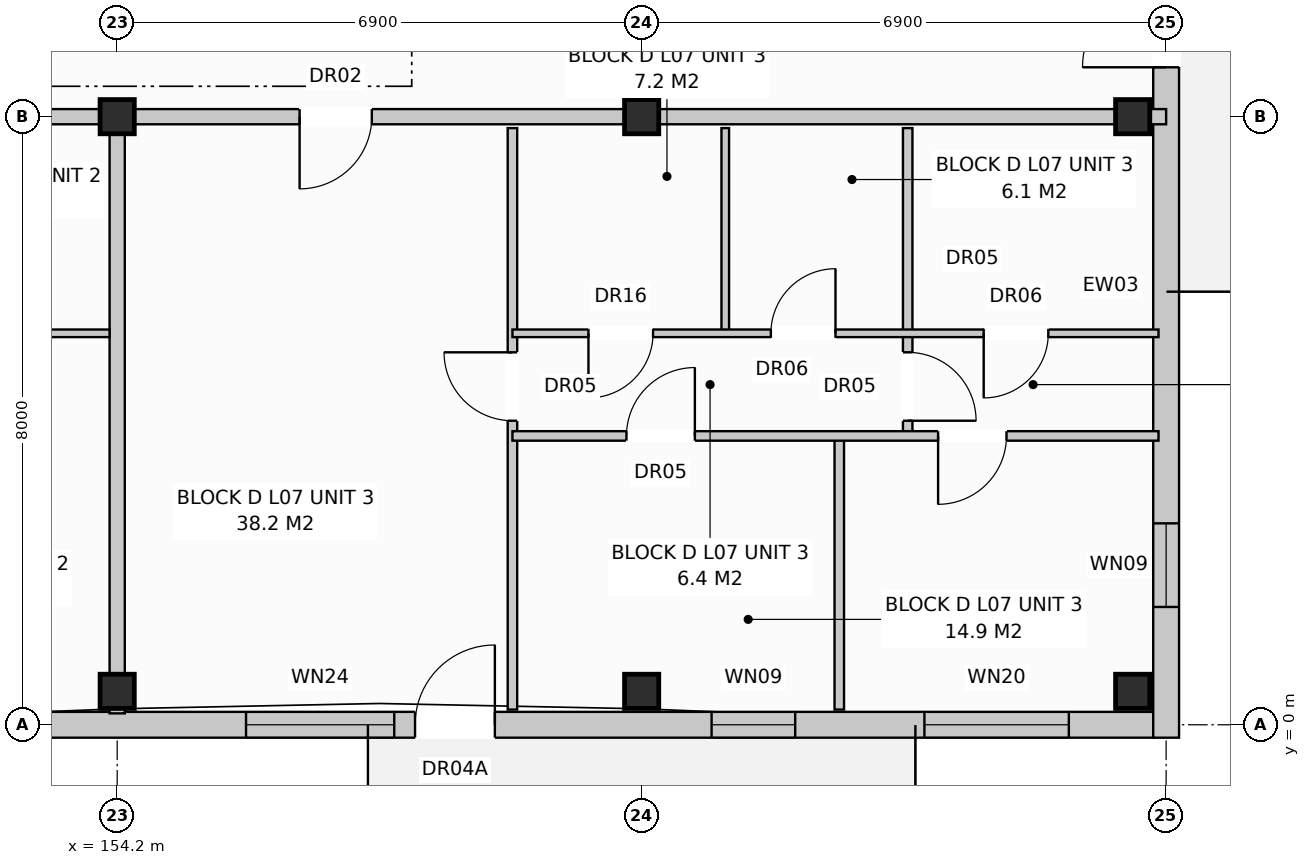
"""IFC4 building model, lengths in metres.
Left out: names, types, materials, properties, quantities, classifications, styles, units other than length and angle.
Written with IfcOpenShell. Run it as: python <this file> out.ifc"""

import sys

from ifc_helpers import new_model, si_unit, direction, frame, frame_2d, origin, origin_with_axes, origin_2d, place, context, subcontext, project, spatial, rectangle, extrude, element, fill, save


model = new_model("IFC4")
c1 = context("Model", 3, precision=1e-05, world=origin(), true_north=direction((0.0, 1.0)))
c2 = subcontext(c1, "Body", "Model", "MODEL_VIEW")
j1 = project(units=[si_unit("LENGTHUNIT", "METRE"), si_unit("PLANEANGLEUNIT", "RADIAN")], contexts=[c1])
p1 = place(None, origin())
s1 = spatial("IfcSite", under=j1, at=p1, CompositionType="ELEMENT")
p2 = place(p1, origin())
s2 = spatial("IfcBuilding", under=s1, at=p2, CompositionType="ELEMENT")
p3 = place(p2, frame((0.0, 0.0, 24.0)))
s3 = spatial("IfcBuildingStorey", under=s2, at=p3, CompositionType="ELEMENT", Elevation=24.0)
for number, where, z_axis, x_axis in (
    (1, (154.2, 0.44, 0.0), (0.0, 0.0, 1.0), (1.0, 0.0, 0.0)),
    (2, (154.2, 8.0, 0.0), (0.0, 0.0, 1.0), (1.0, 0.0, 0.0)),
    (3, (161.1, 0.44, 0.0), (0.0, 0.0, 1.0), (1.0, 0.0, 0.0)),
    (4, (161.1, 8.0, 0.0), (0.0, 0.0, 1.0), (1.0, 0.0, 0.0)),
    (5, (167.56, 0.44, 0.0), (0.0, 0.0, 1.0), (1.0, 0.0, 0.0)),
    (6, (167.56, 8.0, 0.0), (0.0, 0.0, 1.0), (1.0, 0.0, 0.0)),
):
    element("IfcColumn", number, at=place(p3, frame(where, z_axis=z_axis, x_axis=x_axis)), inside=s3, PredefinedType="COLUMN", context=c2, shape_type="SweptSolid", body=[
        extrude(rectangle(XDim=0.45, YDim=0.45, at=origin_2d()), origin(), (0.0, 0.0, 1.0), 3.2),
    ])
p4 = place(p3, frame((126.76, 0.0, 0.0), z_axis=(0.0, 0.0, 1.0), x_axis=(1.0, 0.0, 0.0)))
e7 = element("IfcWall", 7, at=p4, inside=s3, PredefinedType="STANDARD", context=c2, shape_type="SweptSolid", body=[
    extrude(rectangle(XDim=41.08, YDim=0.34, at=frame_2d((20.54, 0.0))), origin(), (0.0, 0.0, 1.0), 2.95),
])
p5 = place(p4, frame((5.06, 0.0, 0.0)))
e8 = element("IfcOpeningElement", 8, at=p5, cuts=e7, PredefinedType="OPENING", context=c2, shape_type="SweptSolid", body=[
    extrude(rectangle(XDim=1.05, YDim=2.12, at=frame_2d((0.525, 1.06))), frame((0.0, 0.182, 0.0), z_axis=(0.0, -1.0, 0.0), x_axis=(1.0, 0.0, 0.0)), (0.0, 0.0, 1.0), 0.364),
])
p6 = place(p4, frame((18.86, 0.0, 0.0)))
e9 = element("IfcOpeningElement", 9, at=p6, cuts=e7, PredefinedType="OPENING", context=c2, shape_type="SweptSolid", body=[
    extrude(rectangle(XDim=1.05, YDim=2.12, at=frame_2d((0.525, 1.06))), frame((0.0, 0.182, 0.0), z_axis=(0.0, -1.0, 0.0), x_axis=(1.0, 0.0, 0.0)), (0.0, 0.0, 1.0), 0.364),
])
p7 = place(p4, frame((31.359, 0.0, 0.0)))
e10 = element("IfcOpeningElement", 10, at=p7, cuts=e7, PredefinedType="OPENING", context=c2, shape_type="SweptSolid", body=[
    extrude(rectangle(XDim=1.05, YDim=2.12, at=frame_2d((0.525, 1.06))), frame((0.0, 0.182, 0.0), z_axis=(0.0, -1.0, 0.0), x_axis=(1.0, 0.0, 0.0)), (0.0, 0.0, 1.0), 0.364),
])
p8 = place(p4, frame((1.11, 0.0, 0.8)))
e11 = element("IfcOpeningElement", 11, at=p8, cuts=e7, PredefinedType="OPENING", context=c2, shape_type="SweptSolid", body=[
    extrude(rectangle(XDim=1.8, YDim=1.7, at=frame_2d((0.9, 0.85))), frame((0.0, 0.182, 0.0), z_axis=(0.0, -1.0, 0.0), x_axis=(1.0, 0.0, 0.0)), (0.0, 0.0, 1.0), 0.364),
])
p9 = place(p4, frame((9.36, 0.0, 0.72)))
e12 = element("IfcOpeningElement", 12, at=p9, cuts=e7, PredefinedType="OPENING", context=c2, shape_type="SweptSolid", body=[
    extrude(rectangle(XDim=1.1, YDim=1.5, at=frame_2d((0.55, 0.75))), frame((0.0, 0.182, 0.0), z_axis=(0.0, -1.0, 0.0), x_axis=(1.0, 0.0, 0.0)), (0.0, 0.0, 1.0), 0.364),
])
p10 = place(p4, frame((14.635, 0.0, 0.8)))
e13 = element("IfcOpeningElement", 13, at=p10, cuts=e7, PredefinedType="OPENING", context=c2, shape_type="SweptSolid", body=[
    extrude(rectangle(XDim=1.95, YDim=1.65, at=frame_2d((0.975, 0.825))), frame((0.0, 0.182, 0.0), z_axis=(0.0, -1.0, 0.0), x_axis=(1.0, 0.0, 0.0)), (0.0, 0.0, 1.0), 0.364),
])
p11 = place(p4, frame((21.46, 0.0, 0.72)))
e14 = element("IfcOpeningElement", 14, at=p11, cuts=e7, PredefinedType="OPENING", context=c2, shape_type="SweptSolid", body=[
    extrude(rectangle(XDim=1.1, YDim=1.5, at=frame_2d((0.55, 0.75))), frame((0.0, 0.182, 0.0), z_axis=(0.0, -1.0, 0.0), x_axis=(1.0, 0.0, 0.0)), (0.0, 0.0, 1.0), 0.364),
])
p12 = place(p4, frame((24.46, 0.0, 0.8)))
e15 = element("IfcOpeningElement", 15, at=p12, cuts=e7, PredefinedType="OPENING", context=c2, shape_type="SweptSolid", body=[
    extrude(rectangle(XDim=1.9, YDim=1.85, at=frame_2d((0.95, 0.925))), frame((0.0, 0.182, 0.0), z_axis=(0.0, -1.0, 0.0), x_axis=(1.0, 0.0, 0.0)), (0.0, 0.0, 1.0), 0.364),
])
p13 = place(p4, frame((29.135, 0.0, 0.8)))
e16 = element("IfcOpeningElement", 16, at=p13, cuts=e7, PredefinedType="OPENING", context=c2, shape_type="SweptSolid", body=[
    extrude(rectangle(XDim=1.95, YDim=1.65, at=frame_2d((0.975, 0.825))), frame((0.0, 0.182, 0.0), z_axis=(0.0, -1.0, 0.0), x_axis=(1.0, 0.0, 0.0)), (0.0, 0.0, 1.0), 0.364),
])
p14 = place(p4, frame((35.26, 0.0, 0.72)))
e17 = element("IfcOpeningElement", 17, at=p14, cuts=e7, PredefinedType="OPENING", context=c2, shape_type="SweptSolid", body=[
    extrude(rectangle(XDim=1.1, YDim=1.5, at=frame_2d((0.55, 0.75))), frame((0.0, 0.182, 0.0), z_axis=(0.0, -1.0, 0.0), x_axis=(1.0, 0.0, 0.0)), (0.0, 0.0, 1.0), 0.364),
])
p15 = place(p4, frame((38.06, 0.0, 0.8)))
e18 = element("IfcOpeningElement", 18, at=p15, cuts=e7, PredefinedType="OPENING", context=c2, shape_type="SweptSolid", body=[
    extrude(rectangle(XDim=1.9, YDim=1.85, at=frame_2d((0.95, 0.925))), frame((0.0, 0.182, 0.0), z_axis=(0.0, -1.0, 0.0), x_axis=(1.0, 0.0, 0.0)), (0.0, 0.0, 1.0), 0.364),
])
p16 = place(p3, frame((168.0, -0.17, 0.0), z_axis=(0.0, 0.0, 1.0), x_axis=(0.0, 1.0, 0.0)))
e19 = element("IfcWall", 19, at=p16, inside=s3, PredefinedType="STANDARD", context=c2, shape_type="SweptSolid", body=[
    extrude(rectangle(XDim=18.74, YDim=0.34, at=frame_2d((9.37, 0.0))), origin(), (0.0, 0.0, 1.0), 2.95),
])
p17 = place(p16, frame((8.82, 0.0, 0.0)))
e20 = element("IfcOpeningElement", 20, at=p17, cuts=e19, PredefinedType="OPENING", context=c2, shape_type="SweptSolid", body=[
    extrude(rectangle(XDim=1.1, YDim=2.1, at=frame_2d((0.55, 1.05))), frame((0.0, 0.182, 0.0), z_axis=(0.0, -1.0, 0.0), x_axis=(1.0, 0.0, 0.0)), (0.0, 0.0, 1.0), 0.364),
])
p18 = place(p16, frame((1.72, 0.0, 0.72)))
e21 = element("IfcOpeningElement", 21, at=p18, cuts=e19, PredefinedType="OPENING", context=c2, shape_type="SweptSolid", body=[
    extrude(rectangle(XDim=1.1, YDim=1.5, at=frame_2d((0.55, 0.75))), frame((0.0, 0.182, 0.0), z_axis=(0.0, -1.0, 0.0), x_axis=(1.0, 0.0, 0.0)), (0.0, 0.0, 1.0), 0.364),
])
p19 = place(p16, frame((15.92, 0.0, 0.72)))
e22 = element("IfcOpeningElement", 22, at=p19, cuts=e19, PredefinedType="OPENING", context=c2, shape_type="SweptSolid", body=[
    extrude(rectangle(XDim=1.1, YDim=1.5, at=frame_2d((0.55, 0.75))), frame((0.0, 0.182, 0.0), z_axis=(0.0, -1.0, 0.0), x_axis=(1.0, 0.0, 0.0)), (0.0, 0.0, 1.0), 0.364),
])
p20 = place(p3, frame((154.2, 7.85, 0.0), z_axis=(0.0, 0.0, 1.0), x_axis=(0.0, -1.0, 0.0)))
e23 = element("IfcWall", 23, at=p20, inside=s3, PredefinedType="PARTITIONING", context=c2, shape_type="SweptSolid", body=[
    extrude(rectangle(XDim=7.7, YDim=0.2, at=frame_2d((3.85, 0.0))), origin(), (0.0, 0.0, 1.0), 2.95),
])
p21 = place(p3, frame((133.5, 8.0, 0.0), z_axis=(0.0, 0.0, 1.0), x_axis=(1.0, 0.0, 0.0)))
e24 = element("IfcWall", 24, at=p21, inside=s3, PredefinedType="PARTITIONING", context=c2, shape_type="SweptSolid", body=[
    extrude(rectangle(XDim=20.7, YDim=0.2, at=frame_2d((10.35, 0.0))), origin(), (0.0, 0.0, 1.0), 2.39),
])
p22 = place(p21, frame((2.4, 0.0, 0.0)))
e25 = element("IfcOpeningElement", 25, at=p22, cuts=e24, PredefinedType="OPENING", context=c2, shape_type="SweptSolid", body=[
    extrude(rectangle(XDim=0.95, YDim=2.15, at=frame_2d((0.475, 1.075))), frame((0.0, 0.112, 0.0), z_axis=(0.0, -1.0, 0.0), x_axis=(1.0, 0.0, 0.0)), (0.0, 0.0, 1.0), 0.224),
])
p23 = place(p3, frame((139.8, 5.15, 0.0), z_axis=(0.0, 0.0, 1.0), x_axis=(1.0, 0.0, 0.0)))
e26 = element("IfcWall", 26, at=p23, inside=s3, PredefinedType="PARTITIONING", context=c2, shape_type="SweptSolid", body=[
    extrude(rectangle(XDim=14.3, YDim=0.1, at=frame_2d((7.15, 0.0))), origin(), (0.0, 0.0, 1.0), 2.95),
])
p24 = place(p23, frame((1.6, 0.0, 0.0)))
e27 = element("IfcOpeningElement", 27, at=p24, cuts=e26, PredefinedType="OPENING", context=c2, shape_type="SweptSolid", body=[
    extrude(rectangle(XDim=0.9, YDim=2.1, at=frame_2d((0.45, 1.05))), frame((0.0, 0.062, 0.0), z_axis=(0.0, -1.0, 0.0), x_axis=(1.0, 0.0, 0.0)), (0.0, 0.0, 1.0), 0.124),
])
p25 = place(p23, frame((5.1, 0.0, 0.0)))
e28 = element("IfcOpeningElement", 28, at=p25, cuts=e26, PredefinedType="OPENING", context=c2, shape_type="SweptSolid", body=[
    extrude(rectangle(XDim=0.85, YDim=2.05, at=frame_2d((0.425, 1.025))), frame((0.0, 0.062, 0.0), z_axis=(0.0, -1.0, 0.0), x_axis=(1.0, 0.0, 0.0)), (0.0, 0.0, 1.0), 0.124),
])
p26 = place(p23, frame((8.2, 0.0, 0.0)))
e29 = element("IfcOpeningElement", 29, at=p26, cuts=e26, PredefinedType="OPENING", context=c2, shape_type="SweptSolid", body=[
    extrude(rectangle(XDim=0.85, YDim=2.05, at=frame_2d((0.425, 1.025))), frame((0.0, 0.062, 0.0), z_axis=(0.0, -1.0, 0.0), x_axis=(1.0, 0.0, 0.0)), (0.0, 0.0, 1.0), 0.124),
])
p27 = place(p23, frame((11.6, 0.0, 0.0)))
e30 = element("IfcOpeningElement", 30, at=p27, cuts=e26, PredefinedType="OPENING", context=c2, shape_type="SweptSolid", body=[
    extrude(rectangle(XDim=0.85, YDim=2.05, at=frame_2d((0.425, 1.025))), frame((0.0, 0.062, 0.0), z_axis=(0.0, -1.0, 0.0), x_axis=(1.0, 0.0, 0.0)), (0.0, 0.0, 1.0), 0.124),
])
p28 = place(p3, frame((154.2, 8.0, 0.0), z_axis=(0.0, 0.0, 1.0), x_axis=(1.0, 0.0, 0.0)))
e31 = element("IfcWall", 31, at=p28, inside=s3, PredefinedType="PARTITIONING", context=c2, shape_type="SweptSolid", body=[
    extrude(rectangle(XDim=13.8, YDim=0.2, at=frame_2d((6.9, 0.0))), origin(), (0.0, 0.0, 1.0), 2.39),
])
p29 = place(p28, frame((2.4, 0.0, 0.0)))
e32 = element("IfcOpeningElement", 32, at=p29, cuts=e31, PredefinedType="OPENING", context=c2, shape_type="SweptSolid", body=[
    extrude(rectangle(XDim=0.95, YDim=2.15, at=frame_2d((0.475, 1.075))), frame((0.0, 0.112, 0.0), z_axis=(0.0, -1.0, 0.0), x_axis=(1.0, 0.0, 0.0)), (0.0, 0.0, 1.0), 0.224),
])
p30 = place(p3, frame((159.4, 7.85, 0.0), z_axis=(0.0, 0.0, 1.0), x_axis=(0.0, -1.0, 0.0)))
e33 = element("IfcWall", 33, at=p30, inside=s3, PredefinedType="PARTITIONING", context=c2, shape_type="SweptSolid", body=[
    extrude(rectangle(XDim=7.65, YDim=0.125, at=frame_2d((3.825, 0.0))), origin(), (0.0, 0.0, 1.0), 2.95),
])
p31 = place(p30, frame((2.95, 0.0, 0.0)))
e34 = element("IfcOpeningElement", 34, at=p31, cuts=e33, PredefinedType="OPENING", context=c2, shape_type="SweptSolid", body=[
    extrude(rectangle(XDim=0.9, YDim=2.1, at=frame_2d((0.45, 1.05))), frame((0.0, 0.074, 0.0), z_axis=(0.0, -1.0, 0.0), x_axis=(1.0, 0.0, 0.0)), (0.0, 0.0, 1.0), 0.149),
])
p32 = place(p3, frame((162.2, 7.85, 0.0), z_axis=(0.0, 0.0, 1.0), x_axis=(0.0, -1.0, 0.0)))
e35 = element("IfcWall", 35, at=p32, inside=s3, PredefinedType="PARTITIONING", context=c2, shape_type="SweptSolid", body=[
    extrude(rectangle(XDim=2.7, YDim=0.1, at=frame_2d((1.35, 0.0))), origin(), (0.0, 0.0, 1.0), 2.95),
])
p33 = place(p3, frame((164.6, 7.85, 0.0), z_axis=(0.0, 0.0, 1.0), x_axis=(0.0, -1.0, 0.0)))
e36 = element("IfcWall", 36, at=p33, inside=s3, PredefinedType="PARTITIONING", context=c2, shape_type="SweptSolid", body=[
    extrude(rectangle(XDim=4.05, YDim=0.125, at=frame_2d((2.025, 0.0))), origin(), (0.0, 0.0, 1.0), 2.95),
])
p34 = place(p33, frame((2.95, 0.0, 0.0)))
e37 = element("IfcOpeningElement", 37, at=p34, cuts=e36, PredefinedType="OPENING", context=c2, shape_type="SweptSolid", body=[
    extrude(rectangle(XDim=0.9, YDim=2.1, at=frame_2d((0.45, 1.05))), frame((0.0, 0.074, 0.0), z_axis=(0.0, -1.0, 0.0), x_axis=(1.0, 0.0, 0.0)), (0.0, 0.0, 1.0), 0.149),
])
p35 = place(p3, frame((163.7, 3.8, 0.0), z_axis=(0.0, 0.0, 1.0), x_axis=(0.0, -1.0, 0.0)))
e38 = element("IfcWall", 38, at=p35, inside=s3, PredefinedType="PARTITIONING", context=c2, shape_type="SweptSolid", body=[
    extrude(rectangle(XDim=3.6, YDim=0.125, at=frame_2d((1.8, 0.0))), origin(), (0.0, 0.0, 1.0), 2.59),
])
p36 = place(p3, frame((159.4, 5.15, 0.0), z_axis=(0.0, 0.0, 1.0), x_axis=(1.0, 0.0, 0.0)))
e39 = element("IfcWall", 39, at=p36, inside=s3, PredefinedType="PARTITIONING", context=c2, shape_type="SweptSolid", body=[
    extrude(rectangle(XDim=8.5, YDim=0.1, at=frame_2d((4.25, 0.0))), origin(), (0.0, 0.0, 1.0), 2.95),
])
p37 = place(p36, frame((1.0, 0.0, 0.0)))
e40 = element("IfcOpeningElement", 40, at=p37, cuts=e39, PredefinedType="OPENING", context=c2, shape_type="SweptSolid", body=[
    extrude(rectangle(XDim=0.85, YDim=2.1, at=frame_2d((0.425, 1.05))), frame((0.0, 0.062, 0.0), z_axis=(0.0, -1.0, 0.0), x_axis=(1.0, 0.0, 0.0)), (0.0, 0.0, 1.0), 0.124),
])
p38 = place(p36, frame((3.4, 0.0, 0.0)))
e41 = element("IfcOpeningElement", 41, at=p38, cuts=e39, PredefinedType="OPENING", context=c2, shape_type="SweptSolid", body=[
    extrude(rectangle(XDim=0.85, YDim=2.05, at=frame_2d((0.425, 1.025))), frame((0.0, 0.062, 0.0), z_axis=(0.0, -1.0, 0.0), x_axis=(1.0, 0.0, 0.0)), (0.0, 0.0, 1.0), 0.124),
])
p39 = place(p36, frame((6.2, 0.0, 0.0)))
e42 = element("IfcOpeningElement", 42, at=p39, cuts=e39, PredefinedType="OPENING", context=c2, shape_type="SweptSolid", body=[
    extrude(rectangle(XDim=0.85, YDim=2.05, at=frame_2d((0.425, 1.025))), frame((0.0, 0.062, 0.0), z_axis=(0.0, -1.0, 0.0), x_axis=(1.0, 0.0, 0.0)), (0.0, 0.0, 1.0), 0.124),
])
p40 = place(p3, frame((159.4, 3.8, 0.0), z_axis=(0.0, 0.0, 1.0), x_axis=(1.0, 0.0, 0.0)))
e43 = element("IfcWall", 43, at=p40, inside=s3, PredefinedType="PARTITIONING", context=c2, shape_type="SweptSolid", body=[
    extrude(rectangle(XDim=8.5, YDim=0.125, at=frame_2d((4.25, 0.0))), origin(), (0.0, 0.0, 1.0), 2.95),
])
p41 = place(p40, frame((1.5, 0.0, 0.0)))
e44 = element("IfcOpeningElement", 44, at=p41, cuts=e43, PredefinedType="OPENING", context=c2, shape_type="SweptSolid", body=[
    extrude(rectangle(XDim=0.9, YDim=2.1, at=frame_2d((0.45, 1.05))), frame((0.0, 0.074, 0.0), z_axis=(0.0, -1.0, 0.0), x_axis=(1.0, 0.0, 0.0)), (0.0, 0.0, 1.0), 0.149),
])
p42 = place(p40, frame((5.6, 0.0, 0.0)))
e45 = element("IfcOpeningElement", 45, at=p42, cuts=e43, PredefinedType="OPENING", context=c2, shape_type="SweptSolid", body=[
    extrude(rectangle(XDim=0.9, YDim=2.1, at=frame_2d((0.45, 1.05))), frame((0.0, 0.074, 0.0), z_axis=(0.0, -1.0, 0.0), x_axis=(1.0, 0.0, 0.0)), (0.0, 0.0, 1.0), 0.149),
])
p43 = place(p7, origin_with_axes())
e46 = element("IfcDoor", 46, at=p43, inside=s3, OperationType="SINGLE_SWING_RIGHT", PredefinedType="DOOR", context=c2, shape_type="SweptSolid", body=[
    extrude(rectangle(XDim=1.05, YDim=2.12, at=frame_2d((0.525, 1.06))), frame((0.0, 0.025, 0.0), z_axis=(0.0, -1.0, 0.0), x_axis=(1.0, 0.0, 0.0)), (0.0, 0.0, 1.0), 0.05),
])
fill(e10, e46)
p44 = place(p13, origin_with_axes())
e47 = element("IfcWindow", 47, at=p44, inside=s3, PartitioningType="SINGLE_PANEL", PredefinedType="WINDOW", context=c2, shape_type="SweptSolid", body=[
    extrude(rectangle(XDim=1.95, YDim=1.65, at=frame_2d((0.975, 0.825))), frame((0.0, 0.03, 0.0), z_axis=(0.0, -1.0, 0.0), x_axis=(1.0, 0.0, 0.0)), (0.0, 0.0, 1.0), 0.06),
])
fill(e16, e47)
p45 = place(p14, origin_with_axes())
e48 = element("IfcWindow", 48, at=p45, inside=s3, PartitioningType="SINGLE_PANEL", PredefinedType="WINDOW", context=c2, shape_type="SweptSolid", body=[
    extrude(rectangle(XDim=1.1, YDim=1.5, at=frame_2d((0.55, 0.75))), frame((0.0, 0.03, 0.0), z_axis=(0.0, -1.0, 0.0), x_axis=(1.0, 0.0, 0.0)), (0.0, 0.0, 1.0), 0.06),
])
fill(e17, e48)
p46 = place(p15, origin_with_axes())
e49 = element("IfcWindow", 49, at=p46, inside=s3, PartitioningType="SINGLE_PANEL", PredefinedType="WINDOW", context=c2, shape_type="SweptSolid", body=[
    extrude(rectangle(XDim=1.9, YDim=1.85, at=frame_2d((0.95, 0.925))), frame((0.0, 0.03, 0.0), z_axis=(0.0, -1.0, 0.0), x_axis=(1.0, 0.0, 0.0)), (0.0, 0.0, 1.0), 0.06),
])
fill(e18, e49)
p47 = place(p17, origin_with_axes())
e50 = element("IfcDoor", 50, at=p47, inside=s3, OperationType="SINGLE_SWING_LEFT", PredefinedType="DOOR", context=c2, shape_type="SweptSolid", body=[
    extrude(rectangle(XDim=1.1, YDim=2.1, at=frame_2d((0.55, 1.05))), frame((0.0, 0.025, 0.0), z_axis=(0.0, -1.0, 0.0), x_axis=(1.0, 0.0, 0.0)), (0.0, 0.0, 1.0), 0.05),
])
fill(e20, e50)
p48 = place(p18, origin_with_axes())
e51 = element("IfcWindow", 51, at=p48, inside=s3, PartitioningType="SINGLE_PANEL", PredefinedType="WINDOW", context=c2, shape_type="SweptSolid", body=[
    extrude(rectangle(XDim=1.1, YDim=1.5, at=frame_2d((0.55, 0.75))), frame((0.0, 0.03, 0.0), z_axis=(0.0, -1.0, 0.0), x_axis=(1.0, 0.0, 0.0)), (0.0, 0.0, 1.0), 0.06),
])
fill(e21, e51)
p49 = place(p29, frame((0.95, 0.0, 0.0), z_axis=(0.0, 0.0, 1.0), x_axis=(-1.0, 0.0, 0.0)))
e52 = element("IfcDoor", 52, at=p49, inside=s3, OperationType="SINGLE_SWING_LEFT", PredefinedType="DOOR", context=c2, shape_type="SweptSolid", body=[
    extrude(rectangle(XDim=0.95, YDim=2.15, at=frame_2d((0.475, 1.075))), frame((0.0, 0.025, 0.0), z_axis=(0.0, -1.0, 0.0), x_axis=(1.0, 0.0, 0.0)), (0.0, 0.0, 1.0), 0.05),
])
fill(e32, e52)
p50 = place(p31, frame((0.9, 0.0, 0.0), z_axis=(0.0, 0.0, 1.0), x_axis=(-1.0, 0.0, 0.0)))
e53 = element("IfcDoor", 53, at=p50, inside=s3, OperationType="SINGLE_SWING_LEFT", PredefinedType="DOOR", context=c2, shape_type="SweptSolid", body=[
    extrude(rectangle(XDim=0.9, YDim=2.1, at=frame_2d((0.45, 1.05))), frame((0.0, 0.025, 0.0), z_axis=(0.0, -1.0, 0.0), x_axis=(1.0, 0.0, 0.0)), (0.0, 0.0, 1.0), 0.05),
])
fill(e34, e53)
p51 = place(p34, origin_with_axes())
e54 = element("IfcDoor", 54, at=p51, inside=s3, OperationType="SINGLE_SWING_RIGHT", PredefinedType="DOOR", context=c2, shape_type="SweptSolid", body=[
    extrude(rectangle(XDim=0.9, YDim=2.1, at=frame_2d((0.45, 1.05))), frame((0.0, 0.025, 0.0), z_axis=(0.0, -1.0, 0.0), x_axis=(1.0, 0.0, 0.0)), (0.0, 0.0, 1.0), 0.05),
])
fill(e37, e54)
p52 = place(p37, frame((0.85, 0.0, 0.0), z_axis=(0.0, 0.0, 1.0), x_axis=(-1.0, 0.0, 0.0)))
e55 = element("IfcDoor", 55, at=p52, inside=s3, OperationType="SINGLE_SWING_LEFT", PredefinedType="DOOR", context=c2, shape_type="SweptSolid", body=[
    extrude(rectangle(XDim=0.85, YDim=2.1, at=frame_2d((0.425, 1.05))), frame((0.0, 0.025, 0.0), z_axis=(0.0, -1.0, 0.0), x_axis=(1.0, 0.0, 0.0)), (0.0, 0.0, 1.0), 0.05),
])
fill(e40, e55)
p53 = place(p38, origin_with_axes())
e56 = element("IfcDoor", 56, at=p53, inside=s3, OperationType="SINGLE_SWING_RIGHT", PredefinedType="DOOR", context=c2, shape_type="SweptSolid", body=[
    extrude(rectangle(XDim=0.85, YDim=2.05, at=frame_2d((0.425, 1.025))), frame((0.0, 0.025, 0.0), z_axis=(0.0, -1.0, 0.0), x_axis=(1.0, 0.0, 0.0)), (0.0, 0.0, 1.0), 0.05),
])
fill(e41, e56)
p54 = place(p39, frame((0.85, 0.0, 0.0), z_axis=(0.0, 0.0, 1.0), x_axis=(-1.0, 0.0, 0.0)))
e57 = element("IfcDoor", 57, at=p54, inside=s3, OperationType="SINGLE_SWING_LEFT", PredefinedType="DOOR", context=c2, shape_type="SweptSolid", body=[
    extrude(rectangle(XDim=0.85, YDim=2.05, at=frame_2d((0.425, 1.025))), frame((0.0, 0.025, 0.0), z_axis=(0.0, -1.0, 0.0), x_axis=(1.0, 0.0, 0.0)), (0.0, 0.0, 1.0), 0.05),
])
fill(e42, e57)
p55 = place(p41, origin_with_axes())
e58 = element("IfcDoor", 58, at=p55, inside=s3, OperationType="SINGLE_SWING_RIGHT", PredefinedType="DOOR", context=c2, shape_type="SweptSolid", body=[
    extrude(rectangle(XDim=0.9, YDim=2.1, at=frame_2d((0.45, 1.05))), frame((0.0, 0.025, 0.0), z_axis=(0.0, -1.0, 0.0), x_axis=(1.0, 0.0, 0.0)), (0.0, 0.0, 1.0), 0.05),
])
fill(e44, e58)
p56 = place(p42, frame((0.9, 0.0, 0.0), z_axis=(0.0, 0.0, 1.0), x_axis=(-1.0, 0.0, 0.0)))
e59 = element("IfcDoor", 59, at=p56, inside=s3, OperationType="SINGLE_SWING_LEFT", PredefinedType="DOOR", context=c2, shape_type="SweptSolid", body=[
    extrude(rectangle(XDim=0.9, YDim=2.1, at=frame_2d((0.45, 1.05))), frame((0.0, 0.025, 0.0), z_axis=(0.0, -1.0, 0.0), x_axis=(1.0, 0.0, 0.0)), (0.0, 0.0, 1.0), 0.05),
])
fill(e45, e59)
save(model, sys.argv[1])
